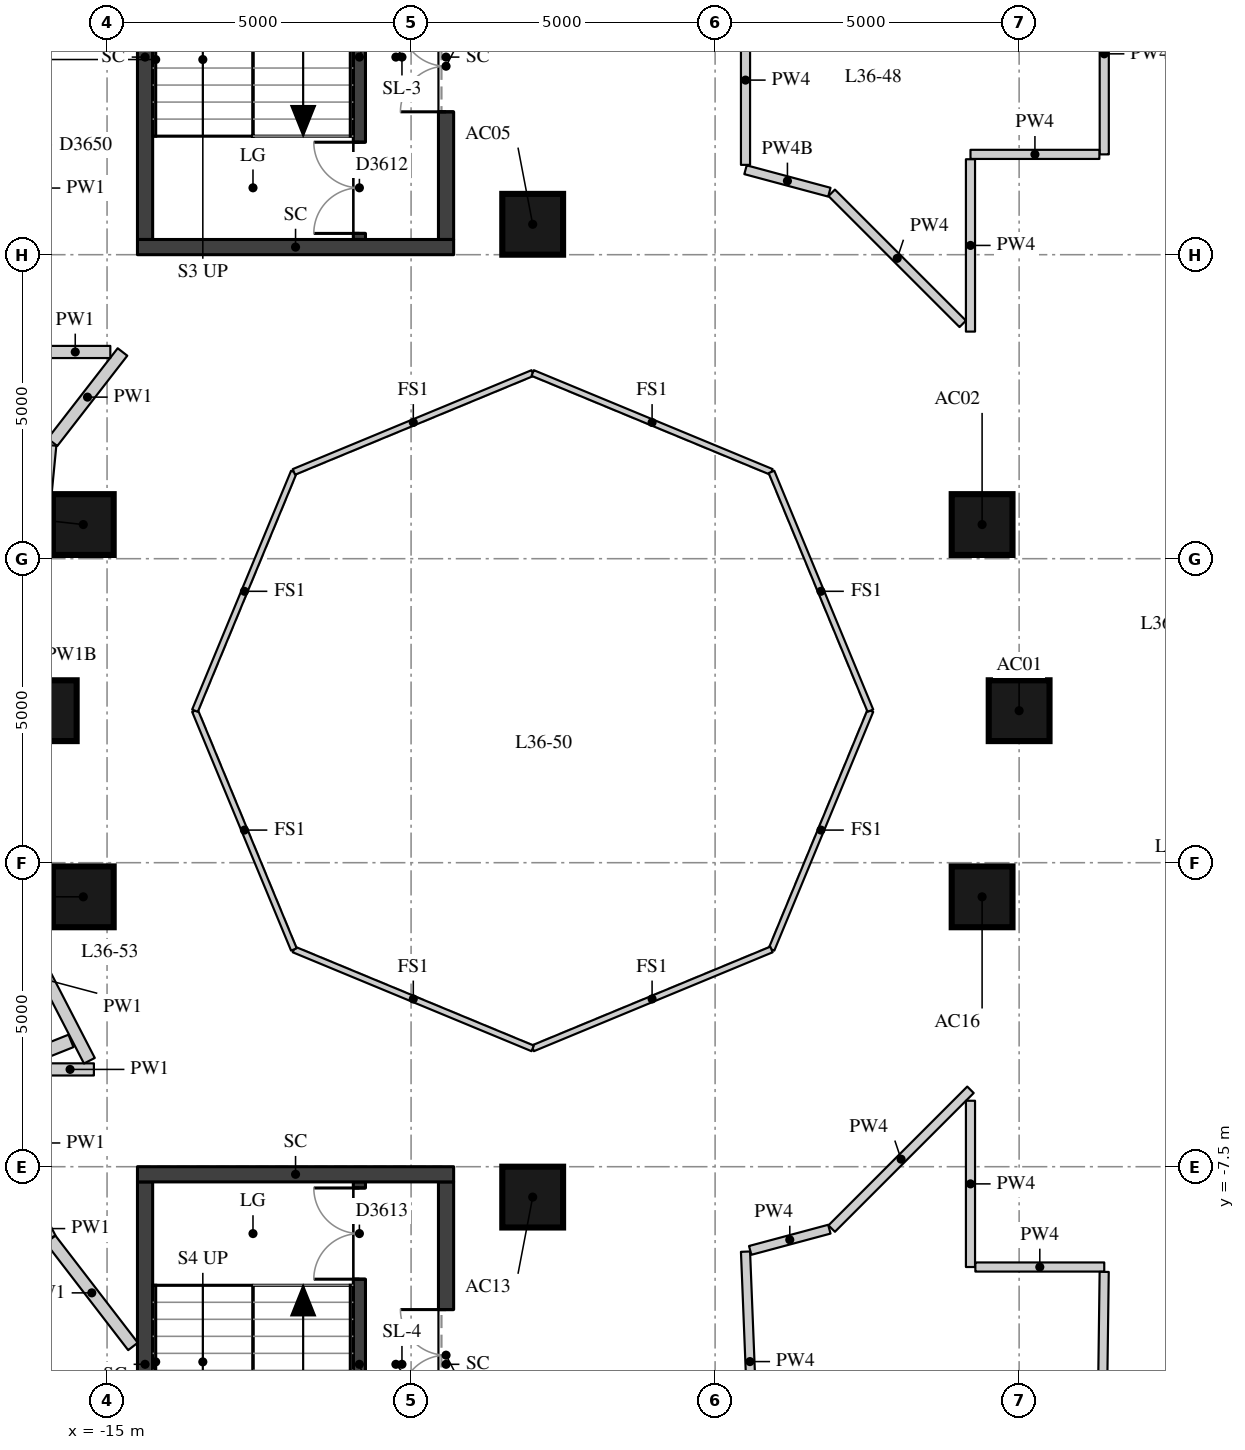
"""IFC4 building model, lengths in metres.
Left out: names, types, materials, properties, quantities, classifications, styles, units other than length and angle.
Written with IfcOpenShell. Run it as: python <this file> out.ifc"""

import sys

from ifc_helpers import new_model, si_unit, direction, frame, frame_2d, origin, origin_2d, place, context, subcontext, project, spatial, rectangle, extrude, element, fill, save


model = new_model("IFC4")
c1 = context("Model", 3, precision=1e-05, world=origin(), true_north=direction((0.0, 1.0)))
c2 = subcontext(c1, "Body", "Model", "MODEL_VIEW")
j1 = project(units=[si_unit("LENGTHUNIT", "METRE"), si_unit("PLANEANGLEUNIT", "RADIAN")], contexts=[c1])
p1 = place(None, origin())
s1 = spatial("IfcSite", under=j1, at=p1, CompositionType="ELEMENT")
p2 = place(p1, origin())
s2 = spatial("IfcBuilding", under=s1, at=p2, CompositionType="ELEMENT")
p3 = place(p2, frame((0.0, 0.0, 128.5)))
s3 = spatial("IfcBuildingStorey", under=s2, at=p3, CompositionType="ELEMENT", Elevation=128.5)
for number, where, z_axis, x_axis in (
    (1, (0.0, 0.0, 0.0), (0.0, 0.0, 1.0), (1.0, 0.0, 0.0)),
    (2, (-0.609, 3.062, 0.0), (0.0, 0.0, 1.0), (1.0, 0.0, 0.0)),
    (3, (-8.0, 8.0, 0.0), (0.0, 0.0, 1.0), (1.0, 0.0, 0.0)),
    (4, (-15.391, 3.062, 0.0), (0.0, 0.0, 1.0), (1.0, 0.0, 0.0)),
    (5, (-16.0, 0.0, 0.0), (0.0, 0.0, 1.0), (1.0, 0.0, 0.0)),
    (6, (-15.391, -3.062, 0.0), (0.0, 0.0, 1.0), (1.0, 0.0, 0.0)),
    (7, (-8.0, -8.0, 0.0), (0.0, 0.0, 1.0), (1.0, 0.0, 0.0)),
    (8, (-0.609, -3.062, 0.0), (0.0, 0.0, 1.0), (1.0, 0.0, 0.0)),
):
    element("IfcColumn", number, at=place(p3, frame(where, z_axis=z_axis, x_axis=x_axis)), inside=s3, PredefinedType="COLUMN", context=c2, shape_type="SweptSolid", body=[
        extrude(rectangle(XDim=1.0, YDim=1.0, at=origin_2d()), origin(), (0.0, 0.0, 1.0), 3.3),
    ])
p4 = place(p3, frame((-10.85, 7.75, 0.0), z_axis=(0.0, 0.0, 1.0), x_axis=(0.0, 1.0, 0.0)))
e9 = element("IfcWall", 9, at=p4, inside=s3, PredefinedType="SHEAR", context=c2, shape_type="SweptSolid", body=[
    extrude(rectangle(XDim=6.0, YDim=0.2, at=frame_2d((3.0, 0.0))), origin(), (0.0, 0.0, 1.0), 3.02),
])
p5 = place(p4, frame((0.1, 0.0, 0.0)))
e10 = element("IfcOpeningElement", 10, at=p5, cuts=e9, PredefinedType="OPENING", context=c2, shape_type="SweptSolid", body=[
    extrude(rectangle(XDim=1.5, YDim=2.1, at=frame_2d((0.75, 1.05))), frame((0.0, 0.11, 0.0), z_axis=(0.0, -1.0, 0.0), x_axis=(1.0, 0.0, 0.0)), (0.0, 0.0, 1.0), 0.22),
])
p6 = place(p3, frame((-10.85, -13.75, 0.0), z_axis=(0.0, 0.0, 1.0), x_axis=(0.0, 1.0, 0.0)))
e11 = element("IfcWall", 11, at=p6, inside=s3, PredefinedType="SHEAR", context=c2, shape_type="SweptSolid", body=[
    extrude(rectangle(XDim=6.0, YDim=0.2, at=frame_2d((3.0, 0.0))), origin(), (0.0, 0.0, 1.0), 3.02),
])
p7 = place(p6, frame((4.4, 0.0, 0.0)))
e12 = element("IfcOpeningElement", 12, at=p7, cuts=e11, PredefinedType="OPENING", context=c2, shape_type="SweptSolid", body=[
    extrude(rectangle(XDim=1.5, YDim=2.1, at=frame_2d((0.75, 1.05))), frame((0.0, 0.11, 0.0), z_axis=(0.0, -1.0, 0.0), x_axis=(1.0, 0.0, 0.0)), (0.0, 0.0, 1.0), 0.22),
])
p8 = place(p3, frame((-14.375, 7.75, -0.28), z_axis=(0.0, 0.0, 1.0), x_axis=(0.0, 1.0, 0.0)))
e13 = element("IfcWall", 13, at=p8, inside=s3, PredefinedType="SHEAR", context=c2, shape_type="SweptSolid", body=[
    extrude(rectangle(XDim=6.0, YDim=0.25, at=frame_2d((3.0, 0.0))), origin(), (0.0, 0.0, 1.0), 3.3),
])
p9 = place(p3, frame((-9.425, 7.75, -0.28), z_axis=(0.0, 0.0, 1.0), x_axis=(0.0, 1.0, 0.0)))
e14 = element("IfcWall", 14, at=p9, inside=s3, PredefinedType="SHEAR", context=c2, shape_type="SweptSolid", body=[
    extrude(rectangle(XDim=6.0, YDim=0.25, at=frame_2d((3.0, 0.0))), origin(), (0.0, 0.0, 1.0), 3.3),
])
p10 = place(p9, frame((2.1, 0.0, 0.28)))
e15 = element("IfcOpeningElement", 15, at=p10, cuts=e14, PredefinedType="OPENING", context=c2, shape_type="SweptSolid", body=[
    extrude(rectangle(XDim=1.5, YDim=2.1, at=frame_2d((0.75, 1.05))), frame((0.0, 0.135, 0.0), z_axis=(0.0, -1.0, 0.0), x_axis=(1.0, 0.0, 0.0)), (0.0, 0.0, 1.0), 0.27),
])
p11 = place(p3, frame((-14.5, 7.625, -0.28), z_axis=(0.0, 0.0, 1.0), x_axis=(1.0, 0.0, 0.0)))
e16 = element("IfcWall", 16, at=p11, inside=s3, PredefinedType="SHEAR", context=c2, shape_type="SweptSolid", body=[
    extrude(rectangle(XDim=5.2, YDim=0.25, at=frame_2d((2.6, 0.0))), origin(), (0.0, 0.0, 1.0), 3.3),
])
p12 = place(p3, frame((-14.375, -13.75, -0.28), z_axis=(0.0, 0.0, 1.0), x_axis=(0.0, 1.0, 0.0)))
e17 = element("IfcWall", 17, at=p12, inside=s3, PredefinedType="SHEAR", context=c2, shape_type="SweptSolid", body=[
    extrude(rectangle(XDim=6.0, YDim=0.25, at=frame_2d((3.0, 0.0))), origin(), (0.0, 0.0, 1.0), 3.3),
])
p13 = place(p3, frame((-9.425, -13.75, -0.28), z_axis=(0.0, 0.0, 1.0), x_axis=(0.0, 1.0, 0.0)))
e18 = element("IfcWall", 18, at=p13, inside=s3, PredefinedType="SHEAR", context=c2, shape_type="SweptSolid", body=[
    extrude(rectangle(XDim=6.0, YDim=0.25, at=frame_2d((3.0, 0.0))), origin(), (0.0, 0.0, 1.0), 3.3),
])
p14 = place(p13, frame((2.4, 0.0, 0.28)))
e19 = element("IfcOpeningElement", 19, at=p14, cuts=e18, PredefinedType="OPENING", context=c2, shape_type="SweptSolid", body=[
    extrude(rectangle(XDim=1.5, YDim=2.1, at=frame_2d((0.75, 1.05))), frame((0.0, 0.135, 0.0), z_axis=(0.0, -1.0, 0.0), x_axis=(1.0, 0.0, 0.0)), (0.0, 0.0, 1.0), 0.27),
])
p15 = place(p3, frame((-14.5, -7.625, -0.28), z_axis=(0.0, 0.0, 1.0), x_axis=(1.0, 0.0, 0.0)))
e20 = element("IfcWall", 20, at=p15, inside=s3, PredefinedType="SHEAR", context=c2, shape_type="SweptSolid", body=[
    extrude(rectangle(XDim=5.2, YDim=0.25, at=frame_2d((2.6, 0.0))), origin(), (0.0, 0.0, 1.0), 3.3),
])
p16 = place(p3, frame((-14.573, -10.456, 0.0), z_axis=(0.0, 0.0, 1.0), x_axis=(-0.60967360535, 0.792652568872, 0.0)))
e21 = element("IfcWall", 21, at=p16, inside=s3, PredefinedType="PARTITIONING", context=c2, shape_type="SweptSolid", body=[
    extrude(rectangle(XDim=2.223, YDim=0.2, at=frame_2d((1.111, 0.0))), origin(), (0.0, 0.0, 1.0), 3.02),
])
p17 = place(p3, frame((-15.938, -8.676, 0.0), z_axis=(0.0, 0.0, 1.0), x_axis=(-0.456525695549, 0.889710227717, 0.0)))
e22 = element("IfcWall", 22, at=p17, inside=s3, PredefinedType="PARTITIONING", context=c2, shape_type="SweptSolid", body=[
    extrude(rectangle(XDim=0.356, YDim=0.2, at=frame_2d((0.178, 0.0))), origin(), (0.0, 0.0, 1.0), 3.02),
])
p18 = place(p3, frame((-16.0, -5.9, 0.0), z_axis=(0.0, 0.0, 1.0), x_axis=(1.0, 0.0, 0.0)))
e23 = element("IfcWall", 23, at=p18, inside=s3, PredefinedType="PARTITIONING", context=c2, shape_type="SweptSolid", body=[
    extrude(rectangle(XDim=0.784, YDim=0.2, at=frame_2d((0.392, 0.0))), origin(), (0.0, 0.0, 1.0), 3.02),
])
p19 = place(p3, frame((-15.291, -5.757, 0.0), z_axis=(0.0, 0.0, 1.0), x_axis=(-0.45873256191, 0.888574384418, 0.0)))
e24 = element("IfcWall", 24, at=p19, inside=s3, PredefinedType="PARTITIONING", context=c2, shape_type="SweptSolid", body=[
    extrude(rectangle(XDim=2.983, YDim=0.2, at=frame_2d((1.491, 0.0))), origin(), (0.0, 0.0, 1.0), 3.02),
])
p20 = place(p3, frame((-16.653, -3.047, 0.0), z_axis=(0.0, 0.0, 1.0), x_axis=(0.096559879606, 0.995327177189, 0.0)))
e25 = element("IfcWall", 25, at=p20, inside=s3, PredefinedType="PARTITIONING", context=c2, shape_type="SweptSolid", body=[
    extrude(rectangle(XDim=7.449, YDim=0.2, at=frame_2d((3.724, 0.0))), origin(), (0.0, 0.0, 1.0), 2.52),
])
p21 = place(p20, frame((0.864, 0.0, 0.0)))
e26 = element("IfcOpeningElement", 26, at=p21, cuts=e25, PredefinedType="OPENING", context=c2, shape_type="SweptSolid", body=[
    extrude(rectangle(XDim=1.1, YDim=2.1, at=frame_2d((0.55, 1.05))), frame((0.0, 0.11, 0.0), z_axis=(0.0, -1.0, 0.0), x_axis=(1.0, 0.0, 0.0)), (0.0, 0.0, 1.0), 0.22),
])
p22 = place(p3, frame((-15.897, 4.415, 0.0), z_axis=(0.0, 0.0, 1.0), x_axis=(0.612626457361, 0.790372585393, 0.0)))
e27 = element("IfcWall", 27, at=p22, inside=s3, PredefinedType="PARTITIONING", context=c2, shape_type="SweptSolid", body=[
    extrude(rectangle(XDim=1.879, YDim=0.2, at=frame_2d((0.939, 0.0))), origin(), (0.0, 0.0, 1.0), 3.02),
])
p23 = place(p3, frame((-14.946, 5.9, 0.0), z_axis=(0.0, 0.0, 1.0), x_axis=(-1.0, 0.0, 0.0)))
e28 = element("IfcWall", 28, at=p23, inside=s3, PredefinedType="PARTITIONING", context=c2, shape_type="SweptSolid", body=[
    extrude(rectangle(XDim=1.154, YDim=0.2, at=frame_2d((0.577, 0.0))), origin(), (0.0, 0.0, 1.0), 3.02),
])
p24 = place(p3, frame((1.4, 12.457, 0.0), z_axis=(0.0, 0.0, 1.0), x_axis=(0.0, -1.0, 0.0)))
e29 = element("IfcWall", 29, at=p24, inside=s3, PredefinedType="PARTITIONING", context=c2, shape_type="SweptSolid", body=[
    extrude(rectangle(XDim=3.307, YDim=0.15, at=frame_2d((1.654, 0.0))), origin(), (0.0, 0.0, 1.0), 3.02),
])
p25 = place(p3, frame((1.32, 9.15, 0.0), z_axis=(0.0, 0.0, 1.0), x_axis=(-1.0, 0.0, 0.0)))
e30 = element("IfcWall", 30, at=p25, inside=s3, PredefinedType="PARTITIONING", context=c2, shape_type="SweptSolid", body=[
    extrude(rectangle(XDim=2.12, YDim=0.15, at=frame_2d((1.06, 0.0))), origin(), (0.0, 0.0, 1.0), 3.02),
])
p26 = place(p3, frame((-0.8, 9.07, 0.0), z_axis=(0.0, 0.0, 1.0), x_axis=(0.0, -1.0, 0.0)))
e31 = element("IfcWall", 31, at=p26, inside=s3, PredefinedType="PARTITIONING", context=c2, shape_type="SweptSolid", body=[
    extrude(rectangle(XDim=2.835, YDim=0.15, at=frame_2d((1.417, 0.0))), origin(), (0.0, 0.0, 1.0), 3.02),
])
p27 = place(p3, frame((-0.927, 6.363, 0.0), z_axis=(0.0, 0.0, 1.0), x_axis=(-0.707106781187, 0.707106781187, 0.0)))
e32 = element("IfcWall", 32, at=p27, inside=s3, PredefinedType="PARTITIONING", context=c2, shape_type="SweptSolid", body=[
    extrude(rectangle(XDim=3.048, YDim=0.15, at=frame_2d((1.524, 0.0))), origin(), (0.0, 0.0, 1.0), 3.02),
])
p28 = place(p3, frame((-3.121, 8.528, 0.0), z_axis=(0.0, 0.0, 1.0), x_axis=(-0.965941945062, 0.258758881529, 0.0)))
e33 = element("IfcWall", 33, at=p28, inside=s3, PredefinedType="PARTITIONING", context=c2, shape_type="SweptSolid", body=[
    extrude(rectangle(XDim=1.427, YDim=0.15, at=frame_2d((0.714, 0.0))), origin(), (0.0, 0.0, 1.0), 2.47),
])
p29 = place(p3, frame((-4.5, 8.977, 0.0), z_axis=(0.0, 0.0, 1.0), x_axis=(0.0, 1.0, 0.0)))
e34 = element("IfcWall", 34, at=p29, inside=s3, PredefinedType="PARTITIONING", context=c2, shape_type="SweptSolid", body=[
    extrude(rectangle(XDim=2.789, YDim=0.15, at=frame_2d((1.394, 0.0))), origin(), (0.0, 0.0, 1.0), 3.02),
])
p30 = place(p3, frame((-3.083, -8.518, 0.0), z_axis=(0.0, 0.0, 1.0), x_axis=(0.707106781187, 0.707106781187, 0.0)))
e35 = element("IfcWall", 35, at=p30, inside=s3, PredefinedType="PARTITIONING", context=c2, shape_type="SweptSolid", body=[
    extrude(rectangle(XDim=3.228, YDim=0.15, at=frame_2d((1.614, 0.0))), origin(), (0.0, 0.0, 1.0), 3.02),
])
p31 = place(p3, frame((-0.8, -6.415, 0.0), z_axis=(0.0, 0.0, 1.0), x_axis=(0.0, -1.0, 0.0)))
e36 = element("IfcWall", 36, at=p31, inside=s3, PredefinedType="PARTITIONING", context=c2, shape_type="SweptSolid", body=[
    extrude(rectangle(XDim=2.735, YDim=0.15, at=frame_2d((1.367, 0.0))), origin(), (0.0, 0.0, 1.0), 3.02),
])
p32 = place(p3, frame((-0.72, -9.15, 0.0), z_axis=(0.0, 0.0, 1.0), x_axis=(1.0, 0.0, 0.0)))
e37 = element("IfcWall", 37, at=p32, inside=s3, PredefinedType="PARTITIONING", context=c2, shape_type="SweptSolid", body=[
    extrude(rectangle(XDim=2.12, YDim=0.15, at=frame_2d((1.06, 0.0))), origin(), (0.0, 0.0, 1.0), 3.02),
])
p33 = place(p3, frame((1.399, -9.23, 0.0), z_axis=(0.0, 0.0, 1.0), x_axis=(-0.013008669764, -0.999915383676, 0.0)))
e38 = element("IfcWall", 38, at=p33, inside=s3, PredefinedType="PARTITIONING", context=c2, shape_type="SweptSolid", body=[
    extrude(rectangle(XDim=4.598, YDim=0.15, at=frame_2d((2.299, 0.0))), origin(), (0.0, 0.0, 1.0), 3.02),
])
p34 = place(p33, frame((1.849, 0.0, 0.0)))
e39 = element("IfcOpeningElement", 39, at=p34, cuts=e38, PredefinedType="OPENING", context=c2, shape_type="SweptSolid", body=[
    extrude(rectangle(XDim=0.9, YDim=2.1, at=frame_2d((0.45, 1.05))), frame((0.0, 0.085, 0.0), z_axis=(0.0, -1.0, 0.0), x_axis=(1.0, 0.0, 0.0)), (0.0, 0.0, 1.0), 0.17),
])
p35 = place(p3, frame((-4.355, -12.513, 0.0), z_axis=(0.0, 0.0, 1.0), x_axis=(-0.040070411422, 0.999196858546, 0.0)))
e40 = element("IfcWall", 40, at=p35, inside=s3, PredefinedType="PARTITIONING", context=c2, shape_type="SweptSolid", body=[
    extrude(rectangle(XDim=3.619, YDim=0.15, at=frame_2d((1.81, 0.0))), origin(), (0.0, 0.0, 1.0), 3.02),
])
p36 = place(p3, frame((-4.423, -8.877, 0.0), z_axis=(0.0, 0.0, 1.0), x_axis=(0.965912469164, 0.258868889429, 0.0)))
e41 = element("IfcWall", 41, at=p36, inside=s3, PredefinedType="PARTITIONING", context=c2, shape_type="SweptSolid", body=[
    extrude(rectangle(XDim=1.348, YDim=0.15, at=frame_2d((0.674, 0.0))), origin(), (0.0, 0.0, 1.0), 3.02),
])
p37 = place(p3, frame((-21.736, -7.887, 0.0), z_axis=(0.0, 0.0, 1.0), x_axis=(0.928547942842, 0.371212496884, 0.0)))
e42 = element("IfcWall", 42, at=p37, inside=s3, PredefinedType="PARTITIONING", context=c2, shape_type="SweptSolid", body=[
    extrude(rectangle(XDim=6.615, YDim=0.22, at=frame_2d((3.308, 0.0))), origin(), (0.0, 0.0, 1.0), 3.02),
])
for number, where, z_axis, x_axis in (
    (43, (-2.446, 0.0, 0.0), (0.0, 0.0, 1.0), (-0.383, -0.924, 0.0)),
    (44, (-4.073, -3.927, 0.0), (0.0, 0.0, 1.0), (-0.924, -0.383, 0.0)),
    (45, (-8.0, -5.554, 0.0), (0.0, 0.0, 1.0), (-0.924, 0.383, 0.0)),
    (46, (-11.927, -3.927, 0.0), (0.0, 0.0, 1.0), (-0.383, 0.924, 0.0)),
    (47, (-13.554, 0.0, 0.0), (0.0, 0.0, 1.0), (0.383, 0.924, 0.0)),
    (48, (-11.927, 3.927, 0.0), (0.0, 0.0, 1.0), (0.924, 0.383, 0.0)),
    (49, (-8.0, 5.554, 0.0), (0.0, 0.0, 1.0), (0.924, -0.383, 0.0)),
    (50, (-4.073, 3.927, 0.0), (0.0, 0.0, 1.0), (0.383, -0.924, 0.0)),
):
    element("IfcWall", number, at=place(p3, frame(where, z_axis=z_axis, x_axis=x_axis)), inside=s3, PredefinedType="PARTITIONING", context=c2, shape_type="SweptSolid", body=[
        extrude(rectangle(XDim=4.251, YDim=0.1, at=frame_2d((2.125, 0.0))), origin(), (0.0, 0.0, 1.0), 3.02),
    ])
p38 = place(p5, origin())
e51 = element("IfcDoor", 51, at=p38, inside=s3, OperationType="DOUBLE_DOOR_SINGLE_SWING", PredefinedType="DOOR", context=c2, shape_type="SweptSolid", body=[
    extrude(rectangle(XDim=1.5, YDim=2.1, at=frame_2d((0.75, 1.05))), frame((0.0, 0.025, 0.0), z_axis=(0.0, -1.0, 0.0), x_axis=(1.0, 0.0, 0.0)), (0.0, 0.0, 1.0), 0.05),
])
fill(e10, e51)
p39 = place(p7, origin())
e52 = element("IfcDoor", 52, at=p39, inside=s3, OperationType="DOUBLE_DOOR_SINGLE_SWING", PredefinedType="DOOR", context=c2, shape_type="SweptSolid", body=[
    extrude(rectangle(XDim=1.5, YDim=2.1, at=frame_2d((0.75, 1.05))), frame((0.0, 0.025, 0.0), z_axis=(0.0, -1.0, 0.0), x_axis=(1.0, 0.0, 0.0)), (0.0, 0.0, 1.0), 0.05),
])
fill(e12, e52)
p40 = place(p10, origin())
e53 = element("IfcDoor", 53, at=p40, inside=s3, OperationType="DOUBLE_DOOR_SINGLE_SWING", PredefinedType="DOOR", context=c2, shape_type="SweptSolid", body=[
    extrude(rectangle(XDim=1.5, YDim=2.1, at=frame_2d((0.75, 1.05))), frame((0.0, 0.025, 0.0), z_axis=(0.0, -1.0, 0.0), x_axis=(1.0, 0.0, 0.0)), (0.0, 0.0, 1.0), 0.05),
])
fill(e15, e53)
p41 = place(p14, origin())
e54 = element("IfcDoor", 54, at=p41, inside=s3, OperationType="DOUBLE_DOOR_SINGLE_SWING", PredefinedType="DOOR", context=c2, shape_type="SweptSolid", body=[
    extrude(rectangle(XDim=1.5, YDim=2.1, at=frame_2d((0.75, 1.05))), frame((0.0, 0.025, 0.0), z_axis=(0.0, -1.0, 0.0), x_axis=(1.0, 0.0, 0.0)), (0.0, 0.0, 1.0), 0.05),
])
fill(e19, e54)
save(model, sys.argv[1])
